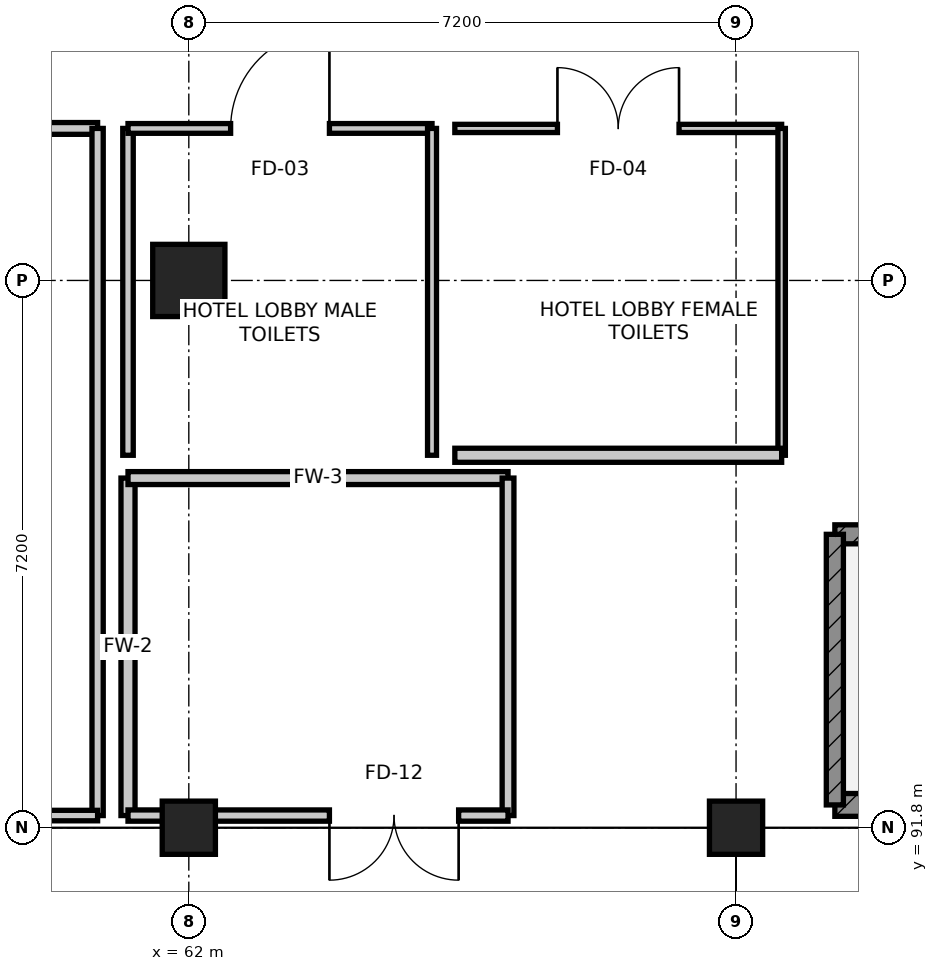
"""IFC4 building model, lengths in metres.
Left out: names, types, materials, properties, quantities, classifications, styles, units other than length and angle.
Written with IfcOpenShell. Run it as: python <this file> out.ifc"""

import sys

from ifc_helpers import new_model, si_unit, direction, frame, frame_2d, origin, origin_2d, place, context, subcontext, project, spatial, rectangle, extrude, element, fill, save


model = new_model("IFC4")
c1 = context("Model", 3, precision=1e-05, world=origin(), true_north=direction((0.0, 1.0)))
c2 = subcontext(c1, "Body", "Model", "MODEL_VIEW")
j1 = project(units=[si_unit("LENGTHUNIT", "METRE"), si_unit("PLANEANGLEUNIT", "RADIAN")], contexts=[c1])
p1 = place(None, origin())
s1 = spatial("IfcSite", under=j1, at=p1, CompositionType="ELEMENT")
p2 = place(p1, origin())
s2 = spatial("IfcBuilding", under=s1, at=p2, CompositionType="ELEMENT")
p3 = place(p2, origin())
s3 = spatial("IfcBuildingStorey", under=s2, at=p3, CompositionType="ELEMENT", Elevation=0.0)
p4 = place(p3, frame((62.0, 91.8, 0.0), z_axis=(0.0, 0.0, 1.0), x_axis=(1.0, 0.0, 0.0)))
e1 = element("IfcColumn", 1, at=p4, inside=s3, PredefinedType="COLUMN", context=c2, shape_type="SweptSolid", body=[
    extrude(rectangle(XDim=0.7, YDim=0.7, at=origin_2d()), origin(), (0.0, 0.0, 1.0), 5.4),
])
p5 = place(p3, frame((62.0, 99.0, 0.0), z_axis=(0.0, 0.0, 1.0), x_axis=(1.0, 0.0, 0.0)))
e2 = element("IfcColumn", 2, at=p5, inside=s3, PredefinedType="COLUMN", context=c2, shape_type="SweptSolid", body=[
    extrude(rectangle(XDim=0.95, YDim=0.95, at=origin_2d()), origin(), (0.0, 0.0, 1.0), 5.4),
])
p6 = place(p3, frame((69.2, 91.8, 0.0), z_axis=(0.0, 0.0, 1.0), x_axis=(1.0, 0.0, 0.0)))
e3 = element("IfcColumn", 3, at=p6, inside=s3, PredefinedType="COLUMN", context=c2, shape_type="SweptSolid", body=[
    extrude(rectangle(XDim=0.7, YDim=0.7, at=origin_2d()), origin(), (0.0, 0.0, 1.0), 5.4),
])
p7 = place(p3, frame((70.5, 92.1, 0.0), z_axis=(0.0, 0.0, 1.0), x_axis=(1.0, 0.0, 0.0)))
e4 = element("IfcWall", 4, at=p7, inside=s3, PredefinedType="SHEAR", context=c2, shape_type="SweptSolid", body=[
    extrude(rectangle(XDim=8.4, YDim=0.3, at=frame_2d((4.2, 0.0))), origin(), (0.0, 0.0, 1.0), 5.1),
])
p8 = place(p3, frame((78.9, 95.66, 0.0), z_axis=(0.0, 0.0, 1.0), x_axis=(-1.0, 0.0, 0.0)))
e5 = element("IfcWall", 5, at=p8, inside=s3, PredefinedType="SHEAR", context=c2, shape_type="SweptSolid", body=[
    extrude(rectangle(XDim=8.4, YDim=0.25, at=frame_2d((4.2, 0.0))), origin(), (0.0, 0.0, 1.0), 5.1),
])
p9 = place(p8, frame((0.39, 0.0, 0.0)))
e6 = element("IfcOpeningElement", 6, at=p9, cuts=e5, PredefinedType="OPENING", context=c2, shape_type="SweptSolid", body=[
    extrude(rectangle(XDim=1.1, YDim=2.1, at=frame_2d((0.55, 1.05))), frame((0.0, 0.135, 0.0), z_axis=(0.0, -1.0, 0.0), x_axis=(1.0, 0.0, 0.0)), (0.0, 0.0, 1.0), 0.27),
])
p10 = place(p3, frame((70.5, 95.66, 0.0), z_axis=(0.0, 0.0, 1.0), x_axis=(0.0, -1.0, 0.0)))
e7 = element("IfcWall", 7, at=p10, inside=s3, PredefinedType="SHEAR", context=c2, shape_type="SweptSolid", body=[
    extrude(rectangle(XDim=3.56, YDim=0.225, at=frame_2d((1.78, 0.0))), origin(), (0.0, 0.0, 1.0), 5.1),
])
p11 = place(p3, frame((54.2, 101.0, 0.0), z_axis=(0.0, 0.0, 1.0), x_axis=(1.0, 0.0, 0.0)))
e8 = element("IfcWall", 8, at=p11, inside=s3, PredefinedType="PARTITIONING", context=c2, shape_type="SweptSolid", body=[
    extrude(rectangle(XDim=6.6, YDim=0.155, at=frame_2d((3.3, 0.0))), origin(), (0.0, 0.0, 1.0), 4.235),
])
p12 = place(p11, frame((2.575, 0.0, 0.0)))
e9 = element("IfcOpeningElement", 9, at=p12, cuts=e8, PredefinedType="OPENING", context=c2, shape_type="SweptSolid", body=[
    extrude(rectangle(XDim=1.45, YDim=2.2, at=frame_2d((0.725, 1.1))), frame((0.0, 0.087, 0.0), z_axis=(0.0, -1.0, 0.0), x_axis=(1.0, 0.0, 0.0)), (0.0, 0.0, 1.0), 0.175),
])
p13 = place(p3, frame((60.8, 101.0, 0.0), z_axis=(0.0, 0.0, 1.0), x_axis=(0.0, -1.0, 0.0)))
e10 = element("IfcWall", 10, at=p13, inside=s3, PredefinedType="PARTITIONING", context=c2, shape_type="SweptSolid", body=[
    extrude(rectangle(XDim=9.04, YDim=0.148, at=frame_2d((4.52, 0.0))), origin(), (0.0, 0.0, 1.0), 4.335),
])
p14 = place(p3, frame((60.8, 91.96, 0.0), z_axis=(0.0, 0.0, 1.0), x_axis=(-1.0, 0.0, 0.0)))
e11 = element("IfcWall", 11, at=p14, inside=s3, PredefinedType="PARTITIONING", context=c2, shape_type="SweptSolid", body=[
    extrude(rectangle(XDim=6.6, YDim=0.138, at=frame_2d((3.3, 0.0))), origin(), (0.0, 0.0, 1.0), 4.335),
])
p15 = place(p3, frame((61.2, 91.96, 0.0), z_axis=(0.0, 0.0, 1.0), x_axis=(0.0, 1.0, 0.0)))
e12 = element("IfcWall", 12, at=p15, inside=s3, PredefinedType="PARTITIONING", context=c2, shape_type="SweptSolid", body=[
    extrude(rectangle(XDim=4.44, YDim=0.185, at=frame_2d((2.22, 0.0))), origin(), (0.0, 0.0, 1.0), 4.335),
])
p16 = place(p3, frame((61.2, 96.4, 0.0), z_axis=(0.0, 0.0, 1.0), x_axis=(1.0, 0.0, 0.0)))
e13 = element("IfcWall", 13, at=p16, inside=s3, PredefinedType="PARTITIONING", context=c2, shape_type="SweptSolid", body=[
    extrude(rectangle(XDim=5.0, YDim=0.17, at=frame_2d((2.5, 0.0))), origin(), (0.0, 0.0, 1.0), 4.235),
])
p17 = place(p3, frame((66.2, 96.4, 0.0), z_axis=(0.0, 0.0, 1.0), x_axis=(0.0, -1.0, 0.0)))
e14 = element("IfcWall", 14, at=p17, inside=s3, PredefinedType="PARTITIONING", context=c2, shape_type="SweptSolid", body=[
    extrude(rectangle(XDim=4.44, YDim=0.155, at=frame_2d((2.22, 0.0))), origin(), (0.0, 0.0, 1.0), 4.335),
])
p18 = place(p3, frame((66.2, 91.96, 0.0), z_axis=(0.0, 0.0, 1.0), x_axis=(-1.0, 0.0, 0.0)))
e15 = element("IfcWall", 15, at=p18, inside=s3, PredefinedType="PARTITIONING", context=c2, shape_type="SweptSolid", body=[
    extrude(rectangle(XDim=5.0, YDim=0.148, at=frame_2d((2.5, 0.0))), origin(), (0.0, 0.0, 1.0), 4.335),
])
p19 = place(p18, frame((0.65, 0.0, 0.0)))
e16 = element("IfcOpeningElement", 16, at=p19, cuts=e15, PredefinedType="OPENING", context=c2, shape_type="SweptSolid", body=[
    extrude(rectangle(XDim=1.7, YDim=2.25, at=frame_2d((0.85, 1.125))), frame((0.0, 0.084, 0.0), z_axis=(0.0, -1.0, 0.0), x_axis=(1.0, 0.0, 0.0)), (0.0, 0.0, 1.0), 0.168),
])
p20 = place(p3, frame((61.2, 96.7, 0.0), z_axis=(0.0, 0.0, 1.0), x_axis=(0.0, 1.0, 0.0)))
e17 = element("IfcWall", 17, at=p20, inside=s3, PredefinedType="PARTITIONING", context=c2, shape_type="SweptSolid", body=[
    extrude(rectangle(XDim=4.3, YDim=0.138, at=frame_2d((2.15, 0.0))), origin(), (0.0, 0.0, 1.0), 4.335),
])
p21 = place(p3, frame((61.2, 101.0, 0.0), z_axis=(0.0, 0.0, 1.0), x_axis=(1.0, 0.0, 0.0)))
e18 = element("IfcWall", 18, at=p21, inside=s3, PredefinedType="PARTITIONING", context=c2, shape_type="SweptSolid", body=[
    extrude(rectangle(XDim=4.0, YDim=0.128, at=frame_2d((2.0, 0.0))), origin(), (0.0, 0.0, 1.0), 4.235),
])
p22 = place(p21, frame((1.35, 0.0, 0.0)))
e19 = element("IfcOpeningElement", 19, at=p22, cuts=e18, PredefinedType="OPENING", context=c2, shape_type="SweptSolid", body=[
    extrude(rectangle(XDim=1.3, YDim=2.15, at=frame_2d((0.65, 1.075))), frame((0.0, 0.074, 0.0), z_axis=(0.0, -1.0, 0.0), x_axis=(1.0, 0.0, 0.0)), (0.0, 0.0, 1.0), 0.148),
])
p23 = place(p3, frame((65.2, 101.0, 0.0), z_axis=(0.0, 0.0, 1.0), x_axis=(0.0, -1.0, 0.0)))
e20 = element("IfcWall", 20, at=p23, inside=s3, PredefinedType="PARTITIONING", context=c2, shape_type="SweptSolid", body=[
    extrude(rectangle(XDim=4.3, YDim=0.118, at=frame_2d((2.15, 0.0))), origin(), (0.0, 0.0, 1.0), 5.1),
])
p24 = place(p3, frame((65.5, 101.0, 0.0), z_axis=(0.0, 0.0, 1.0), x_axis=(1.0, 0.0, 0.0)))
e21 = element("IfcWall", 21, at=p24, inside=s3, PredefinedType="PARTITIONING", context=c2, shape_type="SweptSolid", body=[
    extrude(rectangle(XDim=4.3, YDim=0.108, at=frame_2d((2.15, 0.0))), origin(), (0.0, 0.0, 1.0), 5.1),
])
p25 = place(p24, frame((1.35, 0.0, 0.0)))
e22 = element("IfcOpeningElement", 22, at=p25, cuts=e21, PredefinedType="OPENING", context=c2, shape_type="SweptSolid", body=[
    extrude(rectangle(XDim=1.6, YDim=2.15, at=frame_2d((0.8, 1.075))), frame((0.0, 0.064, 0.0), z_axis=(0.0, -1.0, 0.0), x_axis=(1.0, 0.0, 0.0)), (0.0, 0.0, 1.0), 0.128),
])
p26 = place(p3, frame((69.8, 101.0, 0.0), z_axis=(0.0, 0.0, 1.0), x_axis=(0.0, -1.0, 0.0)))
e23 = element("IfcWall", 23, at=p26, inside=s3, PredefinedType="PARTITIONING", context=c2, shape_type="SweptSolid", body=[
    extrude(rectangle(XDim=4.3, YDim=0.098, at=frame_2d((2.15, 0.0))), origin(), (0.0, 0.0, 1.0), 5.1),
])
p27 = place(p3, frame((69.8, 96.7, 0.0), z_axis=(0.0, 0.0, 1.0), x_axis=(-1.0, 0.0, 0.0)))
e24 = element("IfcWall", 24, at=p27, inside=s3, PredefinedType="PARTITIONING", context=c2, shape_type="SweptSolid", body=[
    extrude(rectangle(XDim=4.3, YDim=0.185, at=frame_2d((2.15, 0.0))), origin(), (0.0, 0.0, 1.0), 5.1),
])
p28 = place(p19, origin())
e25 = element("IfcDoor", 25, at=p28, inside=s3, OperationType="DOUBLE_DOOR_SINGLE_SWING", PredefinedType="DOOR", context=c2, shape_type="SweptSolid", body=[
    extrude(rectangle(XDim=1.7, YDim=2.25, at=frame_2d((0.85, 1.125))), frame((0.0, 0.025, 0.0), z_axis=(0.0, -1.0, 0.0), x_axis=(1.0, 0.0, 0.0)), (0.0, 0.0, 1.0), 0.05),
])
fill(e16, e25)
p29 = place(p22, origin())
e26 = element("IfcDoor", 26, at=p29, inside=s3, OperationType="SINGLE_SWING_RIGHT", PredefinedType="DOOR", context=c2, shape_type="SweptSolid", body=[
    extrude(rectangle(XDim=1.3, YDim=2.15, at=frame_2d((0.65, 1.075))), frame((0.0, 0.025, 0.0), z_axis=(0.0, -1.0, 0.0), x_axis=(1.0, 0.0, 0.0)), (0.0, 0.0, 1.0), 0.05),
])
fill(e19, e26)
p30 = place(p25, origin())
e27 = element("IfcDoor", 27, at=p30, inside=s3, OperationType="DOUBLE_DOOR_SINGLE_SWING", PredefinedType="DOOR", context=c2, shape_type="SweptSolid", body=[
    extrude(rectangle(XDim=1.6, YDim=2.15, at=frame_2d((0.8, 1.075))), frame((0.0, 0.025, 0.0), z_axis=(0.0, -1.0, 0.0), x_axis=(1.0, 0.0, 0.0)), (0.0, 0.0, 1.0), 0.05),
])
fill(e22, e27)
save(model, sys.argv[1])
